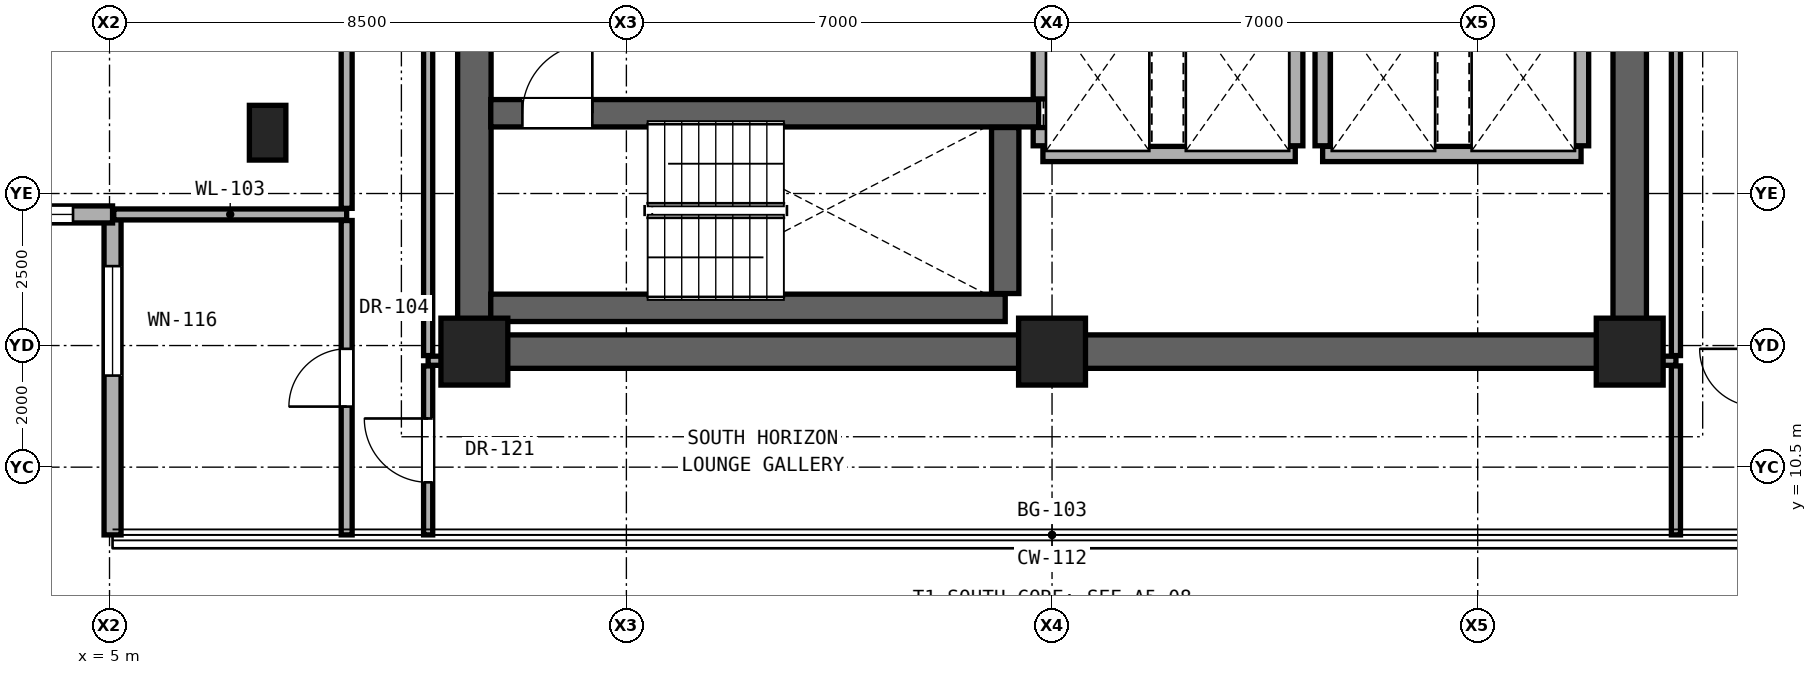
"""IFC4 building model, lengths in metres.
Left out: names, types, materials, properties, quantities, classifications, styles, units other than length and angle.
Written with IfcOpenShell. Run it as: python <this file> out.ifc"""

import sys

from ifc_helpers import new_model, si_unit, direction, frame, frame_2d, origin, origin_2d, place, context, subcontext, project, spatial, rectangle, extrude, element, fill, save


model = new_model("IFC4")
c1 = context("Model", 3, precision=1e-05, world=origin(), true_north=direction((0.0, 1.0)))
c2 = subcontext(c1, "Body", "Model", "MODEL_VIEW")
j1 = project(units=[si_unit("LENGTHUNIT", "METRE"), si_unit("PLANEANGLEUNIT", "RADIAN")], contexts=[c1])
p1 = place(None, origin())
s1 = spatial("IfcSite", under=j1, at=p1, CompositionType="ELEMENT")
p2 = place(p1, origin())
s2 = spatial("IfcBuilding", under=s1, at=p2, CompositionType="ELEMENT")
p3 = place(p2, frame((0.0, 0.0, 128.0)))
s3 = spatial("IfcBuildingStorey", under=s2, at=p3, CompositionType="ELEMENT", Elevation=128.0)
for number, where, z_axis, x_axis in (
    (1, (11.0, 12.4, 0.0), (0.0, 0.0, 1.0), (1.0, 0.0, 0.0)),
    (2, (20.5, 12.4, 0.0), (0.0, 0.0, 1.0), (1.0, 0.0, 0.0)),
    (3, (30.0, 12.4, 0.0), (0.0, 0.0, 1.0), (1.0, 0.0, 0.0)),
):
    element("IfcColumn", number, at=place(p3, frame(where, z_axis=z_axis, x_axis=x_axis)), inside=s3, PredefinedType="COLUMN", context=c2, shape_type="SweptSolid", body=[
        extrude(rectangle(XDim=1.1, YDim=1.1, at=origin_2d()), origin(), (0.0, 0.0, 1.0), 3.3),
    ])
p4 = place(p3, frame((7.6, 16.0, 0.0), z_axis=(0.0, 0.0, 1.0), x_axis=(1.0, 0.0, 0.0)))
e4 = element("IfcColumn", 4, at=p4, inside=s3, PredefinedType="PILASTER", context=c2, shape_type="SweptSolid", body=[
    extrude(rectangle(XDim=0.6, YDim=0.9, at=origin_2d()), origin(), (0.0, 0.0, 1.0), 3.3),
])
p5 = place(p3, frame((11.0, 12.4, 0.0), z_axis=(0.0, 0.0, 1.0), x_axis=(1.0, 0.0, 0.0)))
e5 = element("IfcWall", 5, at=p5, inside=s3, PredefinedType="SHEAR", context=c2, shape_type="SweptSolid", body=[
    extrude(rectangle(XDim=19.0, YDim=0.55, at=frame_2d((9.5, 0.0))), origin(), (0.0, 0.0, 1.0), 3.08),
])
for number, where, z_axis, x_axis in (
    (6, (11.0, 12.4, 0.0), (0.0, 0.0, 1.0), (0.0, 1.0, 0.0)),
    (7, (30.0, 12.4, 0.0), (0.0, 0.0, 1.0), (0.0, 1.0, 0.0)),
):
    element("IfcWall", number, at=place(p3, frame(where, z_axis=z_axis, x_axis=x_axis)), inside=s3, PredefinedType="SHEAR", context=c2, shape_type="SweptSolid", body=[
        extrude(rectangle(XDim=6.0, YDim=0.55, at=frame_2d((3.0, 0.0))), origin(), (0.0, 0.0, 1.0), 3.08),
    ])
p6 = place(p3, frame((5.05, 14.656, 0.0), z_axis=(0.0, 0.0, 1.0), x_axis=(0.0, -1.0, 0.0)))
e8 = element("IfcWall", 8, at=p6, inside=s3, PredefinedType="SOLIDWALL", context=c2, shape_type="SweptSolid", body=[
    extrude(rectangle(XDim=5.27, YDim=0.28, at=frame_2d((2.635, 0.0))), origin(), (0.0, 0.0, 1.0), 3.06),
])
p7 = place(p6, frame((0.85, 0.0, 0.81)))
e9 = element("IfcOpeningElement", 9, at=p7, cuts=e8, PredefinedType="OPENING", context=c2, shape_type="SweptSolid", body=[
    extrude(rectangle(XDim=1.8, YDim=2.1, at=frame_2d((0.9, 1.05))), frame((0.0, 0.15, 0.0), z_axis=(0.0, -1.0, 0.0), x_axis=(1.0, 0.0, 0.0)), (0.0, 0.0, 1.0), 0.3),
])
p8 = place(p3, frame((-0.22, 14.656, 0.0), z_axis=(0.0, 0.0, 1.0), x_axis=(1.0, 0.0, 0.0)))
e10 = element("IfcWall", 10, at=p8, inside=s3, PredefinedType="SOLIDWALL", context=c2, shape_type="SweptSolid", body=[
    extrude(rectangle(XDim=5.27, YDim=0.28, at=frame_2d((2.635, 0.0))), origin(), (0.0, 0.0, 1.0), 3.06),
])
p9 = place(p8, frame((3.52, 0.0, 0.85)))
e11 = element("IfcOpeningElement", 11, at=p9, cuts=e10, PredefinedType="OPENING", context=c2, shape_type="SweptSolid", body=[
    extrude(rectangle(XDim=1.1, YDim=2.0, at=frame_2d((0.55, 1.0))), frame((0.0, 0.15, 0.0), z_axis=(0.0, -1.0, 0.0), x_axis=(1.0, 0.0, 0.0)), (0.0, 0.0, 1.0), 0.3),
])
for number, where, z_axis, x_axis in (
    (12, (10.24, 12.25, 0.0), (0.0, 0.0, 1.0), (1.0, 0.0, 0.0)),
    (13, (30.27, 12.25, 0.0), (0.0, 0.0, 1.0), (1.0, 0.0, 0.0)),
):
    element("IfcWall", number, at=place(p3, frame(where, z_axis=z_axis, x_axis=x_axis)), inside=s3, PredefinedType="PARTITIONING", context=c2, shape_type="SweptSolid", body=[
        extrude(rectangle(XDim=0.49, YDim=0.15, at=frame_2d((0.245, 0.0))), origin(), (0.0, 0.0, 1.0), 3.08),
    ])
p10 = place(p3, frame((11.27, 13.12, 0.0), z_axis=(0.0, 0.0, 1.0), x_axis=(1.0, 0.0, 0.0)))
e14 = element("IfcWall", 14, at=p10, inside=s3, PredefinedType="SHEAR", context=c2, shape_type="SweptSolid", body=[
    extrude(rectangle(XDim=8.46, YDim=0.45, at=frame_2d((4.23, 0.0))), origin(), (0.0, 0.0, 1.0), 3.08),
])
p11 = place(p3, frame((5.07, 14.656, 0.0), z_axis=(0.0, 0.0, 1.0), x_axis=(1.0, 0.0, 0.0)))
e15 = element("IfcWall", 15, at=p11, inside=s3, PredefinedType="PARTITIONING", context=c2, shape_type="SweptSolid", body=[
    extrude(rectangle(XDim=3.83, YDim=0.18, at=frame_2d((1.915, 0.0))), origin(), (0.0, 0.0, 1.0), 3.08),
])
p12 = place(p3, frame((20.35, 15.65, 0.0), z_axis=(0.0, 0.0, 1.0), x_axis=(1.0, 0.0, 0.0)))
e16 = element("IfcWall", 16, at=p12, inside=s3, PredefinedType="SOLIDWALL", context=c2, shape_type="SweptSolid", body=[
    extrude(rectangle(XDim=4.15, YDim=0.25, at=frame_2d((2.075, 0.0))), origin(), (0.0, 0.0, 1.0), 3.08),
])
p13 = place(p3, frame((24.95, 15.65, 0.0), z_axis=(0.0, 0.0, 1.0), x_axis=(1.0, 0.0, 0.0)))
e17 = element("IfcWall", 17, at=p13, inside=s3, PredefinedType="SOLIDWALL", context=c2, shape_type="SweptSolid", body=[
    extrude(rectangle(XDim=4.25, YDim=0.25, at=frame_2d((2.125, 0.0))), origin(), (0.0, 0.0, 1.0), 3.08),
])
p14 = place(p3, frame((11.27, 16.32, 0.0), z_axis=(0.0, 0.0, 1.0), x_axis=(1.0, 0.0, 0.0)))
e18 = element("IfcWall", 18, at=p14, inside=s3, PredefinedType="SHEAR", context=c2, shape_type="SweptSolid", body=[
    extrude(rectangle(XDim=9.01, YDim=0.45, at=frame_2d((4.505, 0.0))), origin(), (0.0, 0.0, 1.0), 3.08),
])
p15 = place(p14, frame((0.52, 0.0, 0.0)))
e19 = element("IfcOpeningElement", 19, at=p15, cuts=e18, PredefinedType="OPENING", context=c2, shape_type="SweptSolid", body=[
    extrude(rectangle(XDim=1.15, YDim=2.2, at=frame_2d((0.575, 1.1))), frame((0.0, 0.235, 0.0), z_axis=(0.0, -1.0, 0.0), x_axis=(1.0, 0.0, 0.0)), (0.0, 0.0, 1.0), 0.47),
])
p16 = place(p3, frame((8.9, 9.386, 0.0), z_axis=(0.0, 0.0, 1.0), x_axis=(0.0, 1.0, 0.0)))
e20 = element("IfcWall", 20, at=p16, inside=s3, PredefinedType="PARTITIONING", context=c2, shape_type="SweptSolid", body=[
    extrude(rectangle(XDim=5.17, YDim=0.18, at=frame_2d((2.585, 0.0))), origin(), (0.0, 0.0, 1.0), 3.08),
])
p17 = place(p16, frame((2.11, 0.0, 0.0)))
e21 = element("IfcOpeningElement", 21, at=p17, cuts=e20, PredefinedType="OPENING", context=c2, shape_type="SweptSolid", body=[
    extrude(rectangle(XDim=0.95, YDim=2.15, at=frame_2d((0.475, 1.075))), frame((0.0, 0.1, 0.0), z_axis=(0.0, -1.0, 0.0), x_axis=(1.0, 0.0, 0.0)), (0.0, 0.0, 1.0), 0.2),
])
p18 = place(p3, frame((8.9, 14.756, 0.0), z_axis=(0.0, 0.0, 1.0), x_axis=(0.0, 1.0, 0.0)))
e22 = element("IfcWall", 22, at=p18, inside=s3, PredefinedType="PARTITIONING", context=c2, shape_type="SweptSolid", body=[
    extrude(rectangle(XDim=8.217, YDim=0.18, at=frame_2d((4.108, 0.0))), origin(), (0.0, 0.0, 1.0), 2.456),
])
p19 = place(p18, frame((3.583, 0.0, 0.0)))
e23 = element("IfcOpeningElement", 23, at=p19, cuts=e22, PredefinedType="OPENING", context=c2, shape_type="SweptSolid", body=[
    extrude(rectangle(XDim=1.05, YDim=2.2, at=frame_2d((0.525, 1.1))), frame((0.0, 0.1, 0.0), z_axis=(0.0, -1.0, 0.0), x_axis=(1.0, 0.0, 0.0)), (0.0, 0.0, 1.0), 0.2),
])
p20 = place(p3, frame((10.24, 9.386, 0.0), z_axis=(0.0, 0.0, 1.0), x_axis=(0.0, 1.0, 0.0)))
e24 = element("IfcWall", 24, at=p20, inside=s3, PredefinedType="PARTITIONING", context=c2, shape_type="SweptSolid", body=[
    extrude(rectangle(XDim=2.779, YDim=0.15, at=frame_2d((1.39, 0.0))), origin(), (0.0, 0.0, 1.0), 3.08),
])
p21 = place(p20, frame((0.865, 0.0, 0.0)))
e25 = element("IfcOpeningElement", 25, at=p21, cuts=e24, PredefinedType="OPENING", context=c2, shape_type="SweptSolid", body=[
    extrude(rectangle(XDim=1.05, YDim=2.2, at=frame_2d((0.525, 1.1))), frame((0.0, 0.085, 0.0), z_axis=(0.0, -1.0, 0.0), x_axis=(1.0, 0.0, 0.0)), (0.0, 0.0, 1.0), 0.17),
])
p22 = place(p3, frame((10.24, 12.335, 0.0), z_axis=(0.0, 0.0, 1.0), x_axis=(0.0, 1.0, 0.0)))
e26 = element("IfcWall", 26, at=p22, inside=s3, PredefinedType="PARTITIONING", context=c2, shape_type="SweptSolid", body=[
    extrude(rectangle(XDim=5.98, YDim=0.15, at=frame_2d((2.99, 0.0))), origin(), (0.0, 0.0, 1.0), 2.456),
])
p23 = place(p3, frame((19.73, 13.355, 0.0), z_axis=(0.0, 0.0, 1.0), x_axis=(0.0, 1.0, 0.0)))
e27 = element("IfcWall", 27, at=p23, inside=s3, PredefinedType="SHEAR", context=c2, shape_type="SweptSolid", body=[
    extrude(rectangle(XDim=2.73, YDim=0.45, at=frame_2d((1.365, 0.0))), origin(), (0.0, 0.0, 1.0), 3.08),
])
p24 = place(p3, frame((20.315, 15.785, 0.0), z_axis=(0.0, 0.0, 1.0), x_axis=(0.0, 1.0, 0.0)))
e28 = element("IfcWall", 28, at=p24, inside=s3, PredefinedType="SOLIDWALL", context=c2, shape_type="SweptSolid", body=[
    extrude(rectangle(XDim=0.3, YDim=0.25, at=frame_2d((0.15, 0.0))), origin(), (0.0, 0.0, 1.0), 3.08),
])
p25 = place(p3, frame((20.315, 16.555, 0.0), z_axis=(0.0, 0.0, 1.0), x_axis=(0.0, 1.0, 0.0)))
e29 = element("IfcWall", 29, at=p25, inside=s3, PredefinedType="SOLIDWALL", context=c2, shape_type="SweptSolid", body=[
    extrude(rectangle(XDim=1.575, YDim=0.25, at=frame_2d((0.788, 0.0))), origin(), (0.0, 0.0, 1.0), 3.08),
])
for number, where, z_axis, x_axis in (
    (30, (24.5, 15.785, 0.0), (0.0, 0.0, 1.0), (0.0, 1.0, 0.0)),
    (31, (24.95, 15.785, 0.0), (0.0, 0.0, 1.0), (0.0, 1.0, 0.0)),
    (32, (29.2, 15.785, 0.0), (0.0, 0.0, 1.0), (0.0, 1.0, 0.0)),
):
    element("IfcWall", number, at=place(p3, frame(where, z_axis=z_axis, x_axis=x_axis)), inside=s3, PredefinedType="SOLIDWALL", context=c2, shape_type="SweptSolid", body=[
        extrude(rectangle(XDim=2.345, YDim=0.25, at=frame_2d((1.172, 0.0))), origin(), (0.0, 0.0, 1.0), 3.08),
    ])
p26 = place(p3, frame((30.76, 9.386, 0.0), z_axis=(0.0, 0.0, 1.0), x_axis=(0.0, 1.0, 0.0)))
e33 = element("IfcWall", 33, at=p26, inside=s3, PredefinedType="PARTITIONING", context=c2, shape_type="SweptSolid", body=[
    extrude(rectangle(XDim=2.779, YDim=0.15, at=frame_2d((1.39, 0.0))), origin(), (0.0, 0.0, 1.0), 3.08),
])
p27 = place(p3, frame((30.76, 12.335, 0.0), z_axis=(0.0, 0.0, 1.0), x_axis=(0.0, 1.0, 0.0)))
e34 = element("IfcWall", 34, at=p27, inside=s3, PredefinedType="PARTITIONING", context=c2, shape_type="SweptSolid", body=[
    extrude(rectangle(XDim=5.98, YDim=0.15, at=frame_2d((2.99, 0.0))), origin(), (0.0, 0.0, 1.0), 2.456),
])
p28 = place(p7, origin())
e35 = element("IfcWindow", 35, at=p28, inside=s3, PartitioningType="SINGLE_PANEL", PredefinedType="WINDOW", context=c2, shape_type="SweptSolid", body=[
    extrude(rectangle(XDim=1.8, YDim=2.1, at=frame_2d((0.9, 1.05))), frame((0.0, 0.03, 0.0), z_axis=(0.0, -1.0, 0.0), x_axis=(1.0, 0.0, 0.0)), (0.0, 0.0, 1.0), 0.06),
])
fill(e9, e35)
p29 = place(p9, origin())
e36 = element("IfcWindow", 36, at=p29, inside=s3, PartitioningType="SINGLE_PANEL", PredefinedType="WINDOW", context=c2, shape_type="SweptSolid", body=[
    extrude(rectangle(XDim=1.1, YDim=2.0, at=frame_2d((0.55, 1.0))), frame((0.0, 0.03, 0.0), z_axis=(0.0, -1.0, 0.0), x_axis=(1.0, 0.0, 0.0)), (0.0, 0.0, 1.0), 0.06),
])
fill(e11, e36)
p30 = place(p15, origin())
e37 = element("IfcDoor", 37, at=p30, inside=s3, OperationType="SINGLE_SWING_RIGHT", PredefinedType="DOOR", context=c2, shape_type="SweptSolid", body=[
    extrude(rectangle(XDim=1.15, YDim=2.2, at=frame_2d((0.575, 1.1))), frame((0.0, 0.025, 0.0), z_axis=(0.0, -1.0, 0.0), x_axis=(1.0, 0.0, 0.0)), (0.0, 0.0, 1.0), 0.05),
])
fill(e19, e37)
p31 = place(p21, origin())
e38 = element("IfcDoor", 38, at=p31, inside=s3, OperationType="SINGLE_SWING_RIGHT", PredefinedType="DOOR", context=c2, shape_type="SweptSolid", body=[
    extrude(rectangle(XDim=1.05, YDim=2.2, at=frame_2d((0.525, 1.1))), frame((0.0, 0.025, 0.0), z_axis=(0.0, -1.0, 0.0), x_axis=(1.0, 0.0, 0.0)), (0.0, 0.0, 1.0), 0.05),
])
fill(e25, e38)
p32 = place(p17, origin())
e39 = element("IfcDoor", 39, at=p32, inside=s3, OperationType="SINGLE_SWING_LEFT", PredefinedType="DOOR", context=c2, shape_type="SweptSolid", body=[
    extrude(rectangle(XDim=0.95, YDim=2.15, at=frame_2d((0.475, 1.075))), frame((0.0, 0.025, 0.0), z_axis=(0.0, -1.0, 0.0), x_axis=(1.0, 0.0, 0.0)), (0.0, 0.0, 1.0), 0.05),
])
fill(e21, e39)
save(model, sys.argv[1])
